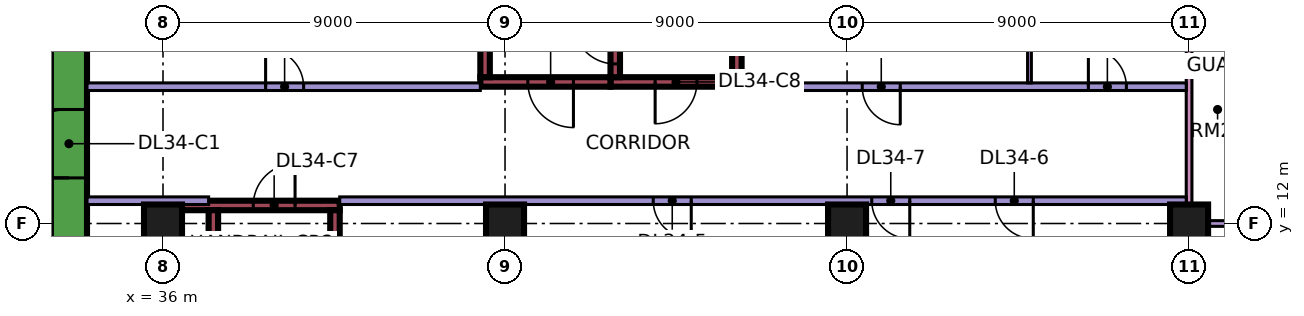
"""IFC4 building model, lengths in metres.
Left out: names, types, materials, properties, quantities, classifications, styles, units other than length and angle.
Written with IfcOpenShell. Run it as: python <this file> out.ifc"""

import sys

from ifc_helpers import new_model, si_unit, direction, frame, frame_2d, origin, origin_2d, place, context, subcontext, project, spatial, rectangle, extrude, element, fill, save


model = new_model("IFC4")
c1 = context("Model", 3, precision=1e-05, world=origin(), true_north=direction((0.0, 1.0)))
c2 = subcontext(c1, "Body", "Model", "MODEL_VIEW")
j1 = project(units=[si_unit("LENGTHUNIT", "METRE"), si_unit("PLANEANGLEUNIT", "RADIAN")], contexts=[c1])
p1 = place(None, origin())
s1 = spatial("IfcSite", under=j1, at=p1, CompositionType="ELEMENT")
p2 = place(p1, origin())
s2 = spatial("IfcBuilding", under=s1, at=p2, CompositionType="ELEMENT")
p3 = place(p2, frame((0.0, 0.0, 146.15)))
s3 = spatial("IfcBuildingStorey", under=s2, at=p3, CompositionType="ELEMENT", Elevation=146.15)
for number, where, z_axis, x_axis in (
    (1, (36.0, 12.0, 0.0), (0.0, 0.0, 1.0), (1.0, 0.0, 0.0)),
    (2, (45.0, 12.0, 0.0), (0.0, 0.0, 1.0), (1.0, 0.0, 0.0)),
    (3, (54.0, 12.0, 0.0), (0.0, 0.0, 1.0), (1.0, 0.0, 0.0)),
    (4, (63.0, 12.0, 0.0), (0.0, 0.0, 1.0), (1.0, 0.0, 0.0)),
):
    element("IfcColumn", number, at=place(p3, frame(where, z_axis=z_axis, x_axis=x_axis)), inside=s3, PredefinedType="COLUMN", context=c2, shape_type="SweptSolid", body=[
        extrude(rectangle(XDim=1.0, YDim=1.0, at=origin_2d()), origin(), (0.0, 0.0, 1.0), 11.25),
    ])
p4 = place(p3, frame((33.525, 7.95, 0.0), z_axis=(0.0, 0.0, 1.0), x_axis=(0.0, 1.0, 0.0)))
e5 = element("IfcWall", 5, at=p4, inside=s3, PredefinedType="SHEAR", context=c2, shape_type="SweptSolid", body=[
    extrude(rectangle(XDim=11.1, YDim=0.95, at=frame_2d((5.55, 0.0))), origin(), (0.0, 0.0, 1.0), 11.25),
])
p5 = place(p4, frame((5.25, 0.0, 0.0)))
e6 = element("IfcOpeningElement", 6, at=p5, cuts=e5, PredefinedType="OPENING", context=c2, shape_type="SweptSolid", body=[
    extrude(rectangle(XDim=1.8, YDim=2.4, at=frame_2d((0.9, 1.2))), frame((0.0, 0.485, 0.0), z_axis=(0.0, -1.0, 0.0), x_axis=(1.0, 0.0, 0.0)), (0.0, 0.0, 1.0), 0.97),
])
p6 = place(p3, frame((36.5, 12.475, 0.0), z_axis=(0.0, 0.0, 1.0), x_axis=(1.0, 0.0, 0.0)))
e7 = element("IfcWall", 7, at=p6, inside=s3, PredefinedType="SHEAR", context=c2, shape_type="SweptSolid", body=[
    extrude(rectangle(XDim=4.15, YDim=0.25, at=frame_2d((2.075, 0.0))), origin(), (0.0, 0.0, 1.0), 11.25),
])
p7 = place(p6, frame((1.875, 0.0, 0.0)))
e8 = element("IfcOpeningElement", 8, at=p7, cuts=e7, PredefinedType="OPENING", context=c2, shape_type="SweptSolid", body=[
    extrude(rectangle(XDim=1.1, YDim=2.2, at=frame_2d((0.55, 1.1))), frame((0.0, 0.135, 0.0), z_axis=(0.0, -1.0, 0.0), x_axis=(1.0, 0.0, 0.0)), (0.0, 0.0, 1.0), 0.27),
])
for number, where, z_axis, x_axis in (
    (9, (37.325, 5.85, 0.0), (0.0, 0.0, 1.0), (0.0, 1.0, 0.0)),
    (10, (40.525, 5.85, 0.0), (0.0, 0.0, 1.0), (0.0, 1.0, 0.0)),
):
    element("IfcWall", number, at=place(p3, frame(where, z_axis=z_axis, x_axis=x_axis)), inside=s3, PredefinedType="SHEAR", context=c2, shape_type="SweptSolid", body=[
        extrude(rectangle(XDim=6.5, YDim=0.25, at=frame_2d((3.25, 0.0))), origin(), (0.0, 0.0, 1.0), 11.25),
    ])
p8 = place(p3, frame((47.775, 15.725, 0.0), z_axis=(0.0, 0.0, 1.0), x_axis=(1.0, 0.0, 0.0)))
e11 = element("IfcWall", 11, at=p8, inside=s3, PredefinedType="SHEAR", context=c2, shape_type="SweptSolid", body=[
    extrude(rectangle(XDim=3.45, YDim=0.25, at=frame_2d((1.725, 0.0))), origin(), (0.0, 0.0, 1.0), 11.25),
])
p9 = place(p8, frame((1.175, 0.0, 0.0)))
e12 = element("IfcOpeningElement", 12, at=p9, cuts=e11, PredefinedType="OPENING", context=c2, shape_type="SweptSolid", body=[
    extrude(rectangle(XDim=1.1, YDim=2.2, at=frame_2d((0.55, 1.1))), frame((0.0, 0.135, 0.0), z_axis=(0.0, -1.0, 0.0), x_axis=(1.0, 0.0, 0.0)), (0.0, 0.0, 1.0), 0.27),
])
p10 = place(p3, frame((47.9, 15.85, 0.0), z_axis=(0.0, 0.0, 1.0), x_axis=(0.0, 1.0, 0.0)))
e13 = element("IfcWall", 13, at=p10, inside=s3, PredefinedType="SHEAR", context=c2, shape_type="SweptSolid", body=[
    extrude(rectangle(XDim=6.5, YDim=0.25, at=frame_2d((3.25, 0.0))), origin(), (0.0, 0.0, 1.0), 11.25),
])
p11 = place(p10, frame((0.35, 0.0, 0.0)))
e14 = element("IfcOpeningElement", 14, at=p11, cuts=e13, PredefinedType="OPENING", context=c2, shape_type="SweptSolid", body=[
    extrude(rectangle(XDim=1.1, YDim=2.2, at=frame_2d((0.55, 1.1))), frame((0.0, 0.135, 0.0), z_axis=(0.0, -1.0, 0.0), x_axis=(1.0, 0.0, 0.0)), (0.0, 0.0, 1.0), 0.27),
])
p12 = place(p3, frame((51.1, 15.85, 0.0), z_axis=(0.0, 0.0, 1.0), x_axis=(0.0, 1.0, 0.0)))
e15 = element("IfcWall", 15, at=p12, inside=s3, PredefinedType="SHEAR", context=c2, shape_type="SweptSolid", body=[
    extrude(rectangle(XDim=6.5, YDim=0.25, at=frame_2d((3.25, 0.0))), origin(), (0.0, 0.0, 1.0), 11.25),
])
p13 = place(p3, frame((44.35, 15.725, 0.0), z_axis=(0.0, 0.0, 1.0), x_axis=(1.0, 0.0, 0.0)))
e16 = element("IfcWall", 16, at=p13, inside=s3, PredefinedType="SHEAR", context=c2, shape_type="SweptSolid", body=[
    extrude(rectangle(XDim=3.425, YDim=0.25, at=frame_2d((1.712, 0.0))), origin(), (0.0, 0.0, 1.0), 11.25),
])
p14 = place(p13, frame((1.25, 0.0, 0.0)))
e17 = element("IfcOpeningElement", 17, at=p14, cuts=e16, PredefinedType="OPENING", context=c2, shape_type="SweptSolid", body=[
    extrude(rectangle(XDim=1.2, YDim=2.2, at=frame_2d((0.6, 1.1))), frame((0.0, 0.135, 0.0), z_axis=(0.0, -1.0, 0.0), x_axis=(1.0, 0.0, 0.0)), (0.0, 0.0, 1.0), 0.27),
])
p15 = place(p3, frame((44.475, 15.85, 0.0), z_axis=(0.0, 0.0, 1.0), x_axis=(0.0, 1.0, 0.0)))
e18 = element("IfcWall", 18, at=p15, inside=s3, PredefinedType="SHEAR", context=c2, shape_type="SweptSolid", body=[
    extrude(rectangle(XDim=6.5, YDim=0.25, at=frame_2d((3.25, 0.0))), origin(), (0.0, 0.0, 1.0), 11.25),
])
p16 = place(p15, frame((1.75, 0.0, 0.0)))
e19 = element("IfcOpeningElement", 19, at=p16, cuts=e18, PredefinedType="OPENING", context=c2, shape_type="SweptSolid", body=[
    extrude(rectangle(XDim=1.1, YDim=2.2, at=frame_2d((0.55, 1.1))), frame((0.0, 0.135, 0.0), z_axis=(0.0, -1.0, 0.0), x_axis=(1.0, 0.0, 0.0)), (0.0, 0.0, 1.0), 0.27),
])
p17 = place(p15, frame((4.3, 0.0, 0.0)))
e20 = element("IfcOpeningElement", 20, at=p17, cuts=e18, PredefinedType="OPENING", context=c2, shape_type="SweptSolid", body=[
    extrude(rectangle(XDim=1.1, YDim=2.2, at=frame_2d((0.55, 1.1))), frame((0.0, 0.135, 0.0), z_axis=(0.0, -1.0, 0.0), x_axis=(1.0, 0.0, 0.0)), (0.0, 0.0, 1.0), 0.27),
])
p18 = place(p3, frame((63.0, 12.075, 0.0), z_axis=(0.0, 0.0, 1.0), x_axis=(0.0, 1.0, 0.0)))
e21 = element("IfcWall", 21, at=p18, inside=s3, PredefinedType="SOLIDWALL", context=c2, shape_type="SweptSolid", body=[
    extrude(rectangle(XDim=10.35, YDim=0.15, at=frame_2d((5.175, 0.0))), origin(), (0.0, 0.0, 1.0), 10.85),
])
p19 = place(p18, frame((5.438, 0.0, 0.45)))
e22 = element("IfcOpeningElement", 22, at=p19, cuts=e21, PredefinedType="OPENING", context=c2, shape_type="SweptSolid", body=[
    extrude(rectangle(XDim=3.0, YDim=9.8, at=frame_2d((1.5, 4.9))), frame((0.0, 0.085, 0.0), z_axis=(0.0, -1.0, 0.0), x_axis=(1.0, 0.0, 0.0)), (0.0, 0.0, 1.0), 0.17),
])
p20 = place(p3, frame((64.5, 12.0, 0.0), z_axis=(0.0, 0.0, 1.0), x_axis=(-1.0, 0.0, 0.0)))
e23 = element("IfcWall", 23, at=p20, inside=s3, PredefinedType="SOLIDWALL", context=c2, shape_type="SweptSolid", body=[
    extrude(rectangle(XDim=1.5, YDim=0.15, at=frame_2d((0.75, 0.0))), origin(), (0.0, 0.0, 1.0), 10.85),
])
p21 = place(p3, frame((34.0, 12.6, 0.0), z_axis=(0.0, 0.0, 1.0), x_axis=(1.0, 0.0, 0.0)))
e24 = element("IfcWall", 24, at=p21, inside=s3, PredefinedType="PARTITIONING", context=c2, shape_type="SweptSolid", body=[
    extrude(rectangle(XDim=3.2, YDim=0.2, at=frame_2d((1.6, 0.0))), origin(), (0.0, 0.0, 1.0), 10.85),
])
p22 = place(p3, frame((34.0, 15.6, 0.0), z_axis=(0.0, 0.0, 1.0), x_axis=(1.0, 0.0, 0.0)))
e25 = element("IfcWall", 25, at=p22, inside=s3, PredefinedType="PARTITIONING", context=c2, shape_type="SweptSolid", body=[
    extrude(rectangle(XDim=10.35, YDim=0.2, at=frame_2d((5.175, 0.0))), origin(), (0.0, 0.0, 1.0), 10.85),
])
p23 = place(p22, frame((4.7, 0.0, 0.0)))
e26 = element("IfcOpeningElement", 26, at=p23, cuts=e25, PredefinedType="OPENING", context=c2, shape_type="SweptSolid", body=[
    extrude(rectangle(XDim=1.0, YDim=2.1, at=frame_2d((0.5, 1.05))), frame((0.0, 0.11, 0.0), z_axis=(0.0, -1.0, 0.0), x_axis=(1.0, 0.0, 0.0)), (0.0, 0.0, 1.0), 0.22),
])
p24 = place(p3, frame((40.65, 12.6, 0.0), z_axis=(0.0, 0.0, 1.0), x_axis=(1.0, 0.0, 0.0)))
e27 = element("IfcWall", 27, at=p24, inside=s3, PredefinedType="PARTITIONING", context=c2, shape_type="SweptSolid", body=[
    extrude(rectangle(XDim=22.276, YDim=0.2, at=frame_2d((11.138, 0.0))), origin(), (0.0, 0.0, 1.0), 10.85),
])
p25 = place(p24, frame((8.25, 0.0, 0.0)))
e28 = element("IfcOpeningElement", 28, at=p25, cuts=e27, PredefinedType="OPENING", context=c2, shape_type="SweptSolid", body=[
    extrude(rectangle(XDim=1.0, YDim=2.1, at=frame_2d((0.5, 1.05))), frame((0.0, 0.11, 0.0), z_axis=(0.0, -1.0, 0.0), x_axis=(1.0, 0.0, 0.0)), (0.0, 0.0, 1.0), 0.22),
])
p26 = place(p24, frame((17.25, 0.0, 0.0)))
e29 = element("IfcOpeningElement", 29, at=p26, cuts=e27, PredefinedType="OPENING", context=c2, shape_type="SweptSolid", body=[
    extrude(rectangle(XDim=1.0, YDim=2.1, at=frame_2d((0.5, 1.05))), frame((0.0, 0.11, 0.0), z_axis=(0.0, -1.0, 0.0), x_axis=(1.0, 0.0, 0.0)), (0.0, 0.0, 1.0), 0.22),
])
p27 = place(p24, frame((14.0, 0.0, 0.0)))
e30 = element("IfcOpeningElement", 30, at=p27, cuts=e27, PredefinedType="OPENING", context=c2, shape_type="SweptSolid", body=[
    extrude(rectangle(XDim=1.0, YDim=2.1, at=frame_2d((0.5, 1.05))), frame((0.0, 0.11, 0.0), z_axis=(0.0, -1.0, 0.0), x_axis=(1.0, 0.0, 0.0)), (0.0, 0.0, 1.0), 0.22),
])
p28 = place(p3, frame((45.0, 0.074, 0.0), z_axis=(0.0, 0.0, 1.0), x_axis=(0.0, 1.0, 0.0)))
e31 = element("IfcWall", 31, at=p28, inside=s3, PredefinedType="PARTITIONING", context=c2, shape_type="SweptSolid", body=[
    extrude(rectangle(XDim=12.426, YDim=0.2, at=frame_2d((6.213, 0.0))), origin(), (0.0, 0.0, 1.0), 10.85),
])
p29 = place(p28, frame((5.826, 0.0, 0.0)))
e32 = element("IfcOpeningElement", 32, at=p29, cuts=e31, PredefinedType="OPENING", context=c2, shape_type="SweptSolid", body=[
    extrude(rectangle(XDim=1.0, YDim=2.1, at=frame_2d((0.5, 1.05))), frame((0.0, 0.11, 0.0), z_axis=(0.0, -1.0, 0.0), x_axis=(1.0, 0.0, 0.0)), (0.0, 0.0, 1.0), 0.22),
])
p30 = place(p3, frame((51.225, 15.6, 0.0), z_axis=(0.0, 0.0, 1.0), x_axis=(1.0, 0.0, 0.0)))
e33 = element("IfcWall", 33, at=p30, inside=s3, PredefinedType="PARTITIONING", context=c2, shape_type="SweptSolid", body=[
    extrude(rectangle(XDim=11.701, YDim=0.2, at=frame_2d((5.851, 0.0))), origin(), (0.0, 0.0, 1.0), 10.85),
])
p31 = place(p30, frame((3.175, 0.0, 0.0)))
e34 = element("IfcOpeningElement", 34, at=p31, cuts=e33, PredefinedType="OPENING", context=c2, shape_type="SweptSolid", body=[
    extrude(rectangle(XDim=1.0, YDim=2.1, at=frame_2d((0.5, 1.05))), frame((0.0, 0.11, 0.0), z_axis=(0.0, -1.0, 0.0), x_axis=(1.0, 0.0, 0.0)), (0.0, 0.0, 1.0), 0.22),
])
p32 = place(p30, frame((9.125, 0.0, 0.0)))
e35 = element("IfcOpeningElement", 35, at=p32, cuts=e33, PredefinedType="OPENING", context=c2, shape_type="SweptSolid", body=[
    extrude(rectangle(XDim=1.0, YDim=2.1, at=frame_2d((0.5, 1.05))), frame((0.0, 0.11, 0.0), z_axis=(0.0, -1.0, 0.0), x_axis=(1.0, 0.0, 0.0)), (0.0, 0.0, 1.0), 0.22),
])
p33 = place(p3, frame((54.0, 0.0, 0.0), z_axis=(0.0, 0.0, 1.0), x_axis=(0.0, 1.0, 0.0)))
e36 = element("IfcWall", 36, at=p33, inside=s3, PredefinedType="PARTITIONING", context=c2, shape_type="SweptSolid", body=[
    extrude(rectangle(XDim=12.5, YDim=0.1, at=frame_2d((6.25, 0.0))), origin(), (0.0, 0.0, 1.0), 10.85),
])
p34 = place(p3, frame((58.8, 15.7, 0.0), z_axis=(0.0, 0.0, 1.0), x_axis=(0.0, 1.0, 0.0)))
e37 = element("IfcWall", 37, at=p34, inside=s3, PredefinedType="PARTITIONING", context=c2, shape_type="SweptSolid", body=[
    extrude(rectangle(XDim=8.3, YDim=0.1, at=frame_2d((4.15, 0.0))), origin(), (0.0, 0.0, 1.0), 10.85),
])
p35 = place(p5, origin())
e38 = element("IfcDoor", 38, at=p35, inside=s3, OperationType="DOUBLE_DOOR_SINGLE_SWING", PredefinedType="DOOR", context=c2, shape_type="SweptSolid", body=[
    extrude(rectangle(XDim=1.8, YDim=2.4, at=frame_2d((0.9, 1.2))), frame((0.0, 0.025, 0.0), z_axis=(0.0, -1.0, 0.0), x_axis=(1.0, 0.0, 0.0)), (0.0, 0.0, 1.0), 0.05),
])
fill(e6, e38)
p36 = place(p7, frame((1.1, 0.0, 0.0), z_axis=(0.0, 0.0, 1.0), x_axis=(-1.0, 0.0, 0.0)))
e39 = element("IfcDoor", 39, at=p36, inside=s3, OperationType="SINGLE_SWING_RIGHT", PredefinedType="DOOR", context=c2, shape_type="SweptSolid", body=[
    extrude(rectangle(XDim=1.1, YDim=2.2, at=frame_2d((0.55, 1.1))), frame((0.0, 0.025, 0.0), z_axis=(0.0, -1.0, 0.0), x_axis=(1.0, 0.0, 0.0)), (0.0, 0.0, 1.0), 0.05),
])
fill(e8, e39)
p37 = place(p9, frame((1.1, 0.0, 0.0), z_axis=(0.0, 0.0, 1.0), x_axis=(-1.0, 0.0, 0.0)))
e40 = element("IfcDoor", 40, at=p37, inside=s3, OperationType="SINGLE_SWING_LEFT", PredefinedType="DOOR", context=c2, shape_type="SweptSolid", body=[
    extrude(rectangle(XDim=1.1, YDim=2.2, at=frame_2d((0.55, 1.1))), frame((0.0, 0.025, 0.0), z_axis=(0.0, -1.0, 0.0), x_axis=(1.0, 0.0, 0.0)), (0.0, 0.0, 1.0), 0.05),
])
fill(e12, e40)
p38 = place(p14, origin())
e41 = element("IfcDoor", 41, at=p38, inside=s3, OperationType="SINGLE_SWING_RIGHT", PredefinedType="DOOR", context=c2, shape_type="SweptSolid", body=[
    extrude(rectangle(XDim=1.2, YDim=2.2, at=frame_2d((0.6, 1.1))), frame((0.0, 0.025, 0.0), z_axis=(0.0, -1.0, 0.0), x_axis=(1.0, 0.0, 0.0)), (0.0, 0.0, 1.0), 0.05),
])
fill(e17, e41)
p39 = place(p11, frame((1.1, 0.0, 0.0), z_axis=(0.0, 0.0, 1.0), x_axis=(-1.0, 0.0, 0.0)))
e42 = element("IfcDoor", 42, at=p39, inside=s3, OperationType="SINGLE_SWING_RIGHT", PredefinedType="DOOR", context=c2, shape_type="SweptSolid", body=[
    extrude(rectangle(XDim=1.1, YDim=2.2, at=frame_2d((0.55, 1.1))), frame((0.0, 0.025, 0.0), z_axis=(0.0, -1.0, 0.0), x_axis=(1.0, 0.0, 0.0)), (0.0, 0.0, 1.0), 0.05),
])
fill(e14, e42)
p40 = place(p23, origin())
e43 = element("IfcDoor", 43, at=p40, inside=s3, OperationType="SINGLE_SWING_LEFT", PredefinedType="DOOR", context=c2, shape_type="SweptSolid", body=[
    extrude(rectangle(XDim=1.0, YDim=2.1, at=frame_2d((0.5, 1.05))), frame((0.0, 0.025, 0.0), z_axis=(0.0, -1.0, 0.0), x_axis=(1.0, 0.0, 0.0)), (0.0, 0.0, 1.0), 0.05),
])
fill(e26, e43)
p41 = place(p31, origin())
e44 = element("IfcDoor", 44, at=p41, inside=s3, OperationType="SINGLE_SWING_RIGHT", PredefinedType="DOOR", context=c2, shape_type="SweptSolid", body=[
    extrude(rectangle(XDim=1.0, YDim=2.1, at=frame_2d((0.5, 1.05))), frame((0.0, 0.025, 0.0), z_axis=(0.0, -1.0, 0.0), x_axis=(1.0, 0.0, 0.0)), (0.0, 0.0, 1.0), 0.05),
])
fill(e34, e44)
p42 = place(p32, origin())
e45 = element("IfcDoor", 45, at=p42, inside=s3, OperationType="SINGLE_SWING_LEFT", PredefinedType="DOOR", context=c2, shape_type="SweptSolid", body=[
    extrude(rectangle(XDim=1.0, YDim=2.1, at=frame_2d((0.5, 1.05))), frame((0.0, 0.025, 0.0), z_axis=(0.0, -1.0, 0.0), x_axis=(1.0, 0.0, 0.0)), (0.0, 0.0, 1.0), 0.05),
])
fill(e35, e45)
p43 = place(p25, origin())
e46 = element("IfcDoor", 46, at=p43, inside=s3, OperationType="SINGLE_SWING_RIGHT", PredefinedType="DOOR", context=c2, shape_type="SweptSolid", body=[
    extrude(rectangle(XDim=1.0, YDim=2.1, at=frame_2d((0.5, 1.05))), frame((0.0, 0.025, 0.0), z_axis=(0.0, -1.0, 0.0), x_axis=(1.0, 0.0, 0.0)), (0.0, 0.0, 1.0), 0.05),
])
fill(e28, e46)
p44 = place(p26, origin())
e47 = element("IfcDoor", 47, at=p44, inside=s3, OperationType="SINGLE_SWING_RIGHT", PredefinedType="DOOR", context=c2, shape_type="SweptSolid", body=[
    extrude(rectangle(XDim=1.0, YDim=2.1, at=frame_2d((0.5, 1.05))), frame((0.0, 0.025, 0.0), z_axis=(0.0, -1.0, 0.0), x_axis=(1.0, 0.0, 0.0)), (0.0, 0.0, 1.0), 0.05),
])
fill(e29, e47)
p45 = place(p27, origin())
e48 = element("IfcDoor", 48, at=p45, inside=s3, OperationType="SINGLE_SWING_RIGHT", PredefinedType="DOOR", context=c2, shape_type="SweptSolid", body=[
    extrude(rectangle(XDim=1.0, YDim=2.1, at=frame_2d((0.5, 1.05))), frame((0.0, 0.025, 0.0), z_axis=(0.0, -1.0, 0.0), x_axis=(1.0, 0.0, 0.0)), (0.0, 0.0, 1.0), 0.05),
])
fill(e30, e48)
save(model, sys.argv[1])
